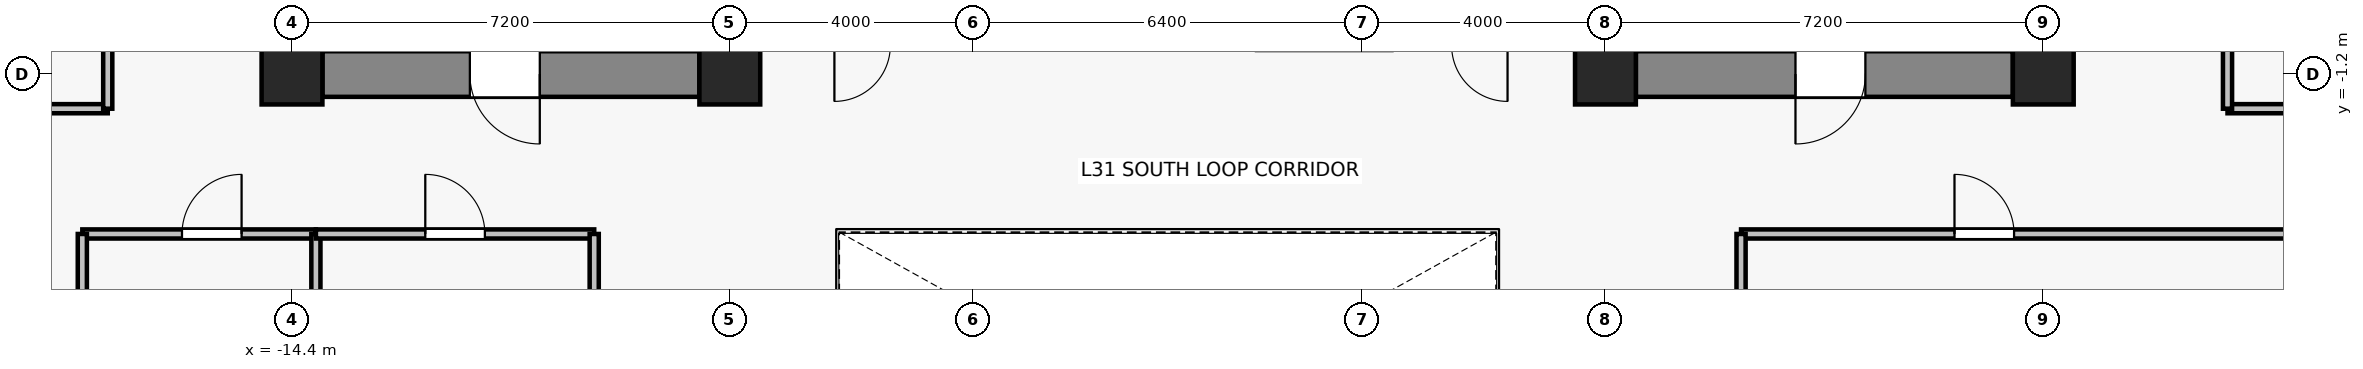
"""IFC4 building model, lengths in metres.
Left out: names, types, materials, properties, quantities, classifications, styles, units other than length and angle.
Written with IfcOpenShell. Run it as: python <this file> out.ifc"""

import sys

from ifc_helpers import new_model, si_unit, direction, frame, frame_2d, origin, origin_2d, place, context, subcontext, project, spatial, rectangle, extrude, source, transform, mapped, element, fill, save


model = new_model("IFC4")
c1 = context("Model", 3, precision=1e-05, world=origin(), true_north=direction((0.0, 1.0)))
c2 = subcontext(c1, "Body", "Model", "MODEL_VIEW")
j1 = project(units=[si_unit("LENGTHUNIT", "METRE"), si_unit("PLANEANGLEUNIT", "RADIAN")], contexts=[c1])
p1 = place(None, origin())
s1 = spatial("IfcSite", under=j1, at=p1, CompositionType="ELEMENT")
p2 = place(p1, origin())
s2 = spatial("IfcBuilding", under=s1, at=p2, CompositionType="ELEMENT")
p3 = place(p2, frame((0.0, 0.0, 113.2)))
s3 = spatial("IfcBuildingStorey", under=s2, at=p3, CompositionType="ELEMENT", Elevation=113.2)
for number, where, z_axis, x_axis in (
    (1, (-14.4, -1.2, 0.0), (0.0, 0.0, 1.0), (1.0, 0.0, 0.0)),
    (2, (-7.2, -1.2, 0.0), (0.0, 0.0, 1.0), (1.0, 0.0, 0.0)),
    (3, (7.2, -1.2, 0.0), (0.0, 0.0, 1.0), (1.0, 0.0, 0.0)),
    (4, (14.4, -1.2, 0.0), (0.0, 0.0, 1.0), (1.0, 0.0, 0.0)),
):
    element("IfcColumn", number, at=place(p3, frame(where, z_axis=z_axis, x_axis=x_axis)), inside=s3, PredefinedType="COLUMN", context=c2, shape_type="SweptSolid", body=[
        extrude(rectangle(XDim=1.0, YDim=1.0, at=origin_2d()), origin(), (0.0, 0.0, 1.0), 3.3),
    ])
p4 = place(p3, frame((-7.7, -1.2, 0.0), z_axis=(0.0, 0.0, 1.0), x_axis=(-1.0, 0.0, 0.0)))
e5 = element("IfcWall", 5, at=p4, inside=s3, PredefinedType="SHEAR", context=c2, shape_type="SweptSolid", body=[
    extrude(rectangle(XDim=6.2, YDim=0.75, at=frame_2d((3.1, 0.0))), origin(), (0.0, 0.0, 1.0), 3.075),
])
p5 = place(p4, frame((2.625, 0.0, 0.0)))
e6 = element("IfcOpeningElement", 6, at=p5, cuts=e5, PredefinedType="OPENING", context=c2, shape_type="SweptSolid", body=[
    extrude(rectangle(XDim=1.15, YDim=2.15, at=frame_2d((0.575, 1.075))), frame((0.0, 0.385, 0.0), z_axis=(0.0, -1.0, 0.0), x_axis=(1.0, 0.0, 0.0)), (0.0, 0.0, 1.0), 0.77),
])
p6 = place(p3, frame((13.9, -1.2, 0.0), z_axis=(0.0, 0.0, 1.0), x_axis=(-1.0, 0.0, 0.0)))
e7 = element("IfcWall", 7, at=p6, inside=s3, PredefinedType="SHEAR", context=c2, shape_type="SweptSolid", body=[
    extrude(rectangle(XDim=6.2, YDim=0.75, at=frame_2d((3.1, 0.0))), origin(), (0.0, 0.0, 1.0), 3.075),
])
p7 = place(p6, frame((2.425, 0.0, 0.0)))
e8 = element("IfcOpeningElement", 8, at=p7, cuts=e7, PredefinedType="OPENING", context=c2, shape_type="SweptSolid", body=[
    extrude(rectangle(XDim=1.15, YDim=2.15, at=frame_2d((0.575, 1.075))), frame((0.0, 0.385, 0.0), z_axis=(0.0, -1.0, 0.0), x_axis=(1.0, 0.0, 0.0)), (0.0, 0.0, 1.0), 0.77),
])
p8 = place(p3, frame((-17.848, -3.83, 0.0), z_axis=(0.0, 0.0, 1.0), x_axis=(1.0, 0.0, 0.0)))
e9 = element("IfcWall", 9, at=p8, inside=s3, PredefinedType="PARTITIONING", context=c2, shape_type="SweptSolid", body=[
    extrude(rectangle(XDim=3.841, YDim=0.15, at=frame_2d((1.92, 0.0))), origin(), (0.0, 0.0, 1.0), 2.515),
])
p9 = place(p8, frame((1.639, 0.0, 0.0)))
e10 = element("IfcOpeningElement", 10, at=p9, cuts=e9, PredefinedType="OPENING", context=c2, shape_type="SweptSolid", body=[
    extrude(rectangle(XDim=0.98, YDim=2.15, at=frame_2d((0.49, 1.075))), frame((0.0, 0.085, 0.0), z_axis=(0.0, -1.0, 0.0), x_axis=(1.0, 0.0, 0.0)), (0.0, 0.0, 1.0), 0.17),
])
p10 = place(p3, frame((-17.848, -12.52, 0.0), z_axis=(0.0, 0.0, 1.0), x_axis=(0.0, 1.0, 0.0)))
e11 = element("IfcWall", 11, at=p10, inside=s3, PredefinedType="PARTITIONING", context=c2, shape_type="SweptSolid", body=[
    extrude(rectangle(XDim=8.69, YDim=0.15, at=frame_2d((4.345, 0.0))), origin(), (0.0, 0.0, 1.0), 2.515),
])
p11 = place(p3, frame((-14.007, -3.83, 0.0), z_axis=(0.0, 0.0, 1.0), x_axis=(0.0, -1.0, 0.0)))
e12 = element("IfcWall", 12, at=p11, inside=s3, PredefinedType="PARTITIONING", context=c2, shape_type="SweptSolid", body=[
    extrude(rectangle(XDim=5.3, YDim=0.15, at=frame_2d((2.65, 0.0))), origin(), (0.0, 0.0, 1.0), 2.615),
])
p12 = place(p3, frame((-14.007, -3.83, 0.0), z_axis=(0.0, 0.0, 1.0), x_axis=(1.0, 0.0, 0.0)))
e13 = element("IfcWall", 13, at=p12, inside=s3, PredefinedType="PARTITIONING", context=c2, shape_type="SweptSolid", body=[
    extrude(rectangle(XDim=4.577, YDim=0.15, at=frame_2d((2.289, 0.0))), origin(), (0.0, 0.0, 1.0), 3.075),
])
p13 = place(p12, frame((1.799, 0.0, 0.0)))
e14 = element("IfcOpeningElement", 14, at=p13, cuts=e13, PredefinedType="OPENING", context=c2, shape_type="SweptSolid", body=[
    extrude(rectangle(XDim=0.98, YDim=2.15, at=frame_2d((0.49, 1.075))), frame((0.0, 0.085, 0.0), z_axis=(0.0, -1.0, 0.0), x_axis=(1.0, 0.0, 0.0)), (0.0, 0.0, 1.0), 0.17),
])
p14 = place(p3, frame((-9.43, -3.83, 0.0), z_axis=(0.0, 0.0, 1.0), x_axis=(0.0, -1.0, 0.0)))
e15 = element("IfcWall", 15, at=p14, inside=s3, PredefinedType="PARTITIONING", context=c2, shape_type="SweptSolid", body=[
    extrude(rectangle(XDim=8.69, YDim=0.15, at=frame_2d((4.345, 0.0))), origin(), (0.0, 0.0, 1.0), 2.515),
])
p15 = place(p3, frame((9.43, -3.83, 0.0), z_axis=(0.0, 0.0, 1.0), x_axis=(1.0, 0.0, 0.0)))
e16 = element("IfcWall", 16, at=p15, inside=s3, PredefinedType="PARTITIONING", context=c2, shape_type="SweptSolid", body=[
    extrude(rectangle(XDim=20.1, YDim=0.15, at=frame_2d((10.05, 0.0))), origin(), (0.0, 0.0, 1.0), 2.515),
])
p16 = place(p15, frame((3.51, 0.0, 0.0)))
e17 = element("IfcOpeningElement", 17, at=p16, cuts=e16, PredefinedType="OPENING", context=c2, shape_type="SweptSolid", body=[
    extrude(rectangle(XDim=0.98, YDim=2.15, at=frame_2d((0.49, 1.075))), frame((0.0, 0.085, 0.0), z_axis=(0.0, -1.0, 0.0), x_axis=(1.0, 0.0, 0.0)), (0.0, 0.0, 1.0), 0.17),
])
p17 = place(p3, frame((9.43, -12.52, 0.0), z_axis=(0.0, 0.0, 1.0), x_axis=(0.0, 1.0, 0.0)))
e18 = element("IfcWall", 18, at=p17, inside=s3, PredefinedType="PARTITIONING", context=c2, shape_type="SweptSolid", body=[
    extrude(rectangle(XDim=8.69, YDim=0.15, at=frame_2d((4.345, 0.0))), origin(), (0.0, 0.0, 1.0), 2.515),
])
p18 = place(p3, frame((-17.43, -1.77, 0.0), z_axis=(0.0, 0.0, 1.0), x_axis=(-1.0, 0.0, 0.0)))
e19 = element("IfcWall", 19, at=p18, inside=s3, PredefinedType="PARTITIONING", context=c2, shape_type="SweptSolid", body=[
    extrude(rectangle(XDim=8.1, YDim=0.15, at=frame_2d((4.05, 0.0))), origin(), (0.0, 0.0, 1.0), 2.515),
])
p19 = place(p3, frame((-17.43, 1.964, 0.0), z_axis=(0.0, 0.0, 1.0), x_axis=(0.0, -1.0, 0.0)))
e20 = element("IfcWall", 20, at=p19, inside=s3, PredefinedType="PARTITIONING", context=c2, shape_type="SweptSolid", body=[
    extrude(rectangle(XDim=3.734, YDim=0.15, at=frame_2d((1.867, 0.0))), origin(), (0.0, 0.0, 1.0), 2.515),
])
p20 = place(p19, frame((1.377, 0.0, 0.0)))
e21 = element("IfcOpeningElement", 21, at=p20, cuts=e20, PredefinedType="OPENING", context=c2, shape_type="SweptSolid", body=[
    extrude(rectangle(XDim=0.98, YDim=2.15, at=frame_2d((0.49, 1.075))), frame((0.0, 0.085, 0.0), z_axis=(0.0, -1.0, 0.0), x_axis=(1.0, 0.0, 0.0)), (0.0, 0.0, 1.0), 0.17),
])
p21 = place(p3, frame((29.53, -1.77, 0.0), z_axis=(0.0, 0.0, 1.0), x_axis=(-1.0, 0.0, 0.0)))
e22 = element("IfcWall", 22, at=p21, inside=s3, PredefinedType="PARTITIONING", context=c2, shape_type="SweptSolid", body=[
    extrude(rectangle(XDim=12.1, YDim=0.15, at=frame_2d((6.05, 0.0))), origin(), (0.0, 0.0, 1.0), 2.515),
])
p22 = place(p3, frame((17.43, -1.77, 0.0), z_axis=(0.0, 0.0, 1.0), x_axis=(0.0, 1.0, 0.0)))
e23 = element("IfcWall", 23, at=p22, inside=s3, PredefinedType="PARTITIONING", context=c2, shape_type="SweptSolid", body=[
    extrude(rectangle(XDim=6.292, YDim=0.15, at=frame_2d((3.146, 0.0))), origin(), (0.0, 0.0, 1.0), 2.515),
])
p23 = place(p22, frame((2.656, 0.0, 0.0)))
e24 = element("IfcOpeningElement", 24, at=p23, cuts=e23, PredefinedType="OPENING", context=c2, shape_type="SweptSolid", body=[
    extrude(rectangle(XDim=0.98, YDim=2.15, at=frame_2d((0.49, 1.075))), frame((0.0, 0.085, 0.0), z_axis=(0.0, -1.0, 0.0), x_axis=(1.0, 0.0, 0.0)), (0.0, 0.0, 1.0), 0.17),
])
m1 = source(origin(), c2, "Body", "SweptSolid", [
    extrude(rectangle(XDim=1.15, YDim=2.15, at=frame_2d((0.575, 1.075))), frame((0.0, 0.025, 0.0), z_axis=(0.0, -1.0, 0.0), x_axis=(1.0, 0.0, 0.0)), (0.0, 0.0, 1.0), 0.05),
])
p24 = place(p5, origin())
e25 = element("IfcDoor", 25, at=p24, inside=s3, OperationType="SINGLE_SWING_LEFT", PredefinedType="DOOR", context=c2, shape_type="MappedRepresentation", body=[
    mapped(m1, transform((0.0, 0.0, 0.0), x_axis=(1.0, 0.0, 0.0), y_axis=(0.0, 1.0, 0.0), z_axis=(0.0, 0.0, 1.0), scale=1.0)),
])
fill(e6, e25)
p25 = place(p7, origin())
e26 = element("IfcDoor", 26, at=p25, inside=s3, OperationType="SINGLE_SWING_RIGHT", PredefinedType="DOOR", context=c2, shape_type="MappedRepresentation", body=[
    mapped(m1, transform((0.0, 0.0, 0.0), x_axis=(1.0, 0.0, 0.0), y_axis=(0.0, 1.0, 0.0), z_axis=(0.0, 0.0, 1.0), scale=1.0)),
])
fill(e8, e26)
m2 = source(origin(), c2, "Body", "SweptSolid", [
    extrude(rectangle(XDim=0.98, YDim=2.15, at=frame_2d((0.49, 1.075))), frame((0.0, 0.025, 0.0), z_axis=(0.0, -1.0, 0.0), x_axis=(1.0, 0.0, 0.0)), (0.0, 0.0, 1.0), 0.05),
])
p26 = place(p9, origin())
e27 = element("IfcDoor", 27, at=p26, inside=s3, OperationType="SINGLE_SWING_RIGHT", PredefinedType="DOOR", context=c2, shape_type="MappedRepresentation", body=[
    mapped(m2, transform((0.0, 0.0, 0.0), x_axis=(1.0, 0.0, 0.0), y_axis=(0.0, 1.0, 0.0), z_axis=(0.0, 0.0, 1.0), scale=1.0)),
])
fill(e10, e27)
p27 = place(p13, origin())
e28 = element("IfcDoor", 28, at=p27, inside=s3, OperationType="SINGLE_SWING_LEFT", PredefinedType="DOOR", context=c2, shape_type="MappedRepresentation", body=[
    mapped(m2, transform((0.0, 0.0, 0.0), x_axis=(1.0, 0.0, 0.0), y_axis=(0.0, 1.0, 0.0), z_axis=(0.0, 0.0, 1.0), scale=1.0)),
])
fill(e14, e28)
p28 = place(p16, origin())
e29 = element("IfcDoor", 29, at=p28, inside=s3, OperationType="SINGLE_SWING_LEFT", PredefinedType="DOOR", context=c2, shape_type="MappedRepresentation", body=[
    mapped(m2, transform((0.0, 0.0, 0.0), x_axis=(1.0, 0.0, 0.0), y_axis=(0.0, 1.0, 0.0), z_axis=(0.0, 0.0, 1.0), scale=1.0)),
])
fill(e17, e29)
save(model, sys.argv[1])
